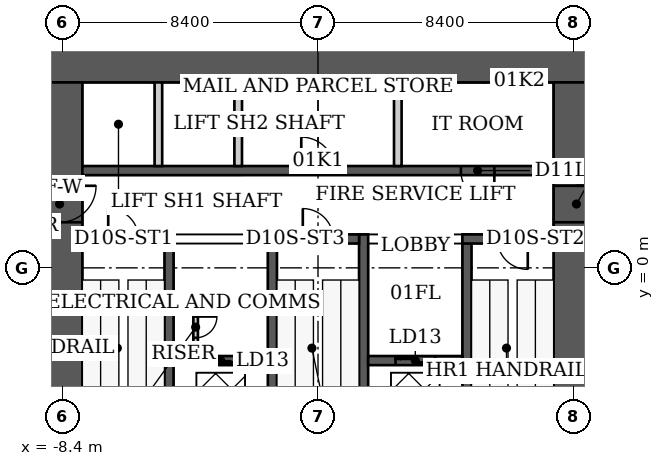
"""IFC4 building model, lengths in metres.
Left out: names, types, materials, properties, quantities, classifications, styles, units other than length and angle.
Written with IfcOpenShell. Run it as: python <this file> out.ifc"""

import sys

from ifc_helpers import new_model, si_unit, direction, frame, frame_2d, origin, place, context, subcontext, project, spatial, rectangle, extrude, element, fill, save


model = new_model("IFC4")
c1 = context("Model", 3, precision=1e-05, world=origin(), true_north=direction((0.0, 1.0)))
c2 = subcontext(c1, "Body", "Model", "MODEL_VIEW")
j1 = project(units=[si_unit("LENGTHUNIT", "METRE"), si_unit("PLANEANGLEUNIT", "RADIAN")], contexts=[c1])
p1 = place(None, origin())
s1 = spatial("IfcSite", under=j1, at=p1, CompositionType="ELEMENT")
p2 = place(p1, origin())
s2 = spatial("IfcBuilding", under=s1, at=p2, CompositionType="ELEMENT")
p3 = place(p2, frame((0.0, 0.0, 6.0)))
s3 = spatial("IfcBuildingStorey", under=s2, at=p3, CompositionType="ELEMENT", Elevation=6.0)
p4 = place(p3, frame((-9.25, 6.85, 0.0), z_axis=(0.0, 0.0, 1.0), x_axis=(1.0, 0.0, 0.0)))
e1 = element("IfcWall", 1, at=p4, inside=s3, PredefinedType="SHEAR", context=c2, shape_type="SweptSolid", body=[
    extrude(rectangle(XDim=18.5, YDim=1.5, at=frame_2d((9.25, 0.0))), origin(), (0.0, 0.0, 1.0), 6.0),
])
p5 = place(p3, frame((-8.5, -9.2, 0.0), z_axis=(0.0, 0.0, 1.0), x_axis=(0.0, 1.0, 0.0)))
e2 = element("IfcWall", 2, at=p5, inside=s3, PredefinedType="SHEAR", context=c2, shape_type="SweptSolid", body=[
    extrude(rectangle(XDim=15.3, YDim=1.5, at=frame_2d((7.65, 0.0))), origin(), (0.0, 0.0, 1.0), 6.0),
])
p6 = place(p5, frame((10.7, 0.0, 0.0)))
e3 = element("IfcOpeningElement", 3, at=p6, cuts=e2, PredefinedType="OPENING", context=c2, shape_type="SweptSolid", body=[
    extrude(rectangle(XDim=1.2, YDim=2.2, at=frame_2d((0.6, 1.1))), frame((0.0, 0.75, 0.0), z_axis=(0.0, -1.0, 0.0), x_axis=(1.0, 0.0, 0.0)), (0.0, 0.0, 1.0), 1.5),
])
p7 = place(p3, frame((8.5, -9.2, 0.0), z_axis=(0.0, 0.0, 1.0), x_axis=(0.0, 1.0, 0.0)))
e4 = element("IfcWall", 4, at=p7, inside=s3, PredefinedType="SHEAR", context=c2, shape_type="SweptSolid", body=[
    extrude(rectangle(XDim=15.3, YDim=1.5, at=frame_2d((7.65, 0.0))), origin(), (0.0, 0.0, 1.0), 6.0),
])
p8 = place(p7, frame((10.7, 0.0, 0.0)))
e5 = element("IfcOpeningElement", 5, at=p8, cuts=e4, PredefinedType="OPENING", context=c2, shape_type="SweptSolid", body=[
    extrude(rectangle(XDim=1.2, YDim=2.2, at=frame_2d((0.6, 1.1))), frame((0.0, 0.75, 0.0), z_axis=(0.0, -1.0, 0.0), x_axis=(1.0, 0.0, 0.0)), (0.0, 0.0, 1.0), 1.5),
])
for number, where, z_axis, x_axis in (
    (6, (-4.9, -6.1, 0.0), (0.0, 0.0, 1.0), (0.0, 1.0, 0.0)),
    (7, (-1.5, -6.1, 0.0), (0.0, 0.0, 1.0), (0.0, 1.0, 0.0)),
    (8, (1.5, -6.1, 0.0), (0.0, 0.0, 1.0), (0.0, 1.0, 0.0)),
    (9, (4.9, -6.1, 0.0), (0.0, 0.0, 1.0), (0.0, 1.0, 0.0)),
):
    element("IfcWall", number, at=place(p3, frame(where, z_axis=z_axis, x_axis=x_axis)), inside=s3, PredefinedType="SHEAR", context=c2, shape_type="SweptSolid", body=[
        extrude(rectangle(XDim=7.2, YDim=0.3, at=frame_2d((3.6, 0.0))), origin(), (0.0, 0.0, 1.0), 6.0),
    ])
p9 = place(p3, frame((-7.75, 0.95, 0.0), z_axis=(0.0, 0.0, 1.0), x_axis=(1.0, 0.0, 0.0)))
e10 = element("IfcWall", 10, at=p9, inside=s3, PredefinedType="SHEAR", context=c2, shape_type="SweptSolid", body=[
    extrude(rectangle(XDim=3.0, YDim=0.3, at=frame_2d((1.5, 0.0))), origin(), (0.0, 0.0, 1.0), 6.0),
])
p10 = place(p9, frame((0.85, 0.0, 0.0)))
e11 = element("IfcOpeningElement", 11, at=p10, cuts=e10, PredefinedType="OPENING", context=c2, shape_type="SweptSolid", body=[
    extrude(rectangle(XDim=1.0, YDim=2.2, at=frame_2d((0.5, 1.1))), frame((0.0, 0.15, 0.0), z_axis=(0.0, -1.0, 0.0), x_axis=(1.0, 0.0, 0.0)), (0.0, 0.0, 1.0), 0.3),
])
p11 = place(p3, frame((-1.35, 0.95, 0.0), z_axis=(0.0, 0.0, 1.0), x_axis=(1.0, 0.0, 0.0)))
e12 = element("IfcWall", 12, at=p11, inside=s3, PredefinedType="SHEAR", context=c2, shape_type="SweptSolid", body=[
    extrude(rectangle(XDim=2.7, YDim=0.3, at=frame_2d((1.35, 0.0))), origin(), (0.0, 0.0, 1.0), 6.0),
])
p12 = place(p11, frame((0.85, 0.0, 0.0)))
e13 = element("IfcOpeningElement", 13, at=p12, cuts=e12, PredefinedType="OPENING", context=c2, shape_type="SweptSolid", body=[
    extrude(rectangle(XDim=1.0, YDim=2.2, at=frame_2d((0.5, 1.1))), frame((0.0, 0.15, 0.0), z_axis=(0.0, -1.0, 0.0), x_axis=(1.0, 0.0, 0.0)), (0.0, 0.0, 1.0), 0.3),
])
p13 = place(p3, frame((4.75, 0.95, 0.0), z_axis=(0.0, 0.0, 1.0), x_axis=(1.0, 0.0, 0.0)))
e14 = element("IfcWall", 14, at=p13, inside=s3, PredefinedType="SHEAR", context=c2, shape_type="SweptSolid", body=[
    extrude(rectangle(XDim=3.0, YDim=0.3, at=frame_2d((1.5, 0.0))), origin(), (0.0, 0.0, 1.0), 6.0),
])
p14 = place(p13, frame((1.15, 0.0, 0.0)))
e15 = element("IfcOpeningElement", 15, at=p14, cuts=e14, PredefinedType="OPENING", context=c2, shape_type="SweptSolid", body=[
    extrude(rectangle(XDim=1.0, YDim=2.2, at=frame_2d((0.5, 1.1))), frame((0.0, 0.15, 0.0), z_axis=(0.0, -1.0, 0.0), x_axis=(1.0, 0.0, 0.0)), (0.0, 0.0, 1.0), 0.3),
])
p15 = place(p3, frame((-4.75, -3.05, 0.0), z_axis=(0.0, 0.0, 1.0), x_axis=(1.0, 0.0, 0.0)))
e16 = element("IfcWall", 16, at=p15, inside=s3, PredefinedType="SHEAR", context=c2, shape_type="SweptSolid", body=[
    extrude(rectangle(XDim=3.1, YDim=0.3, at=frame_2d((1.55, 0.0))), origin(), (0.0, 0.0, 1.0), 6.0),
])
p16 = place(p15, frame((0.9, 0.0, 0.0)))
e17 = element("IfcOpeningElement", 17, at=p16, cuts=e16, PredefinedType="OPENING", context=c2, shape_type="SweptSolid", body=[
    extrude(rectangle(XDim=1.3, YDim=2.1, at=frame_2d((0.65, 1.05))), frame((0.0, 0.15, 0.0), z_axis=(0.0, -1.0, 0.0), x_axis=(1.0, 0.0, 0.0)), (0.0, 0.0, 1.0), 0.3),
])
p17 = place(p3, frame((1.65, -3.05, 0.0), z_axis=(0.0, 0.0, 1.0), x_axis=(1.0, 0.0, 0.0)))
e18 = element("IfcWall", 18, at=p17, inside=s3, PredefinedType="SHEAR", context=c2, shape_type="SweptSolid", body=[
    extrude(rectangle(XDim=3.1, YDim=0.3, at=frame_2d((1.55, 0.0))), origin(), (0.0, 0.0, 1.0), 6.0),
])
p18 = place(p17, frame((0.9, 0.0, 0.0)))
e19 = element("IfcOpeningElement", 19, at=p18, cuts=e18, PredefinedType="OPENING", context=c2, shape_type="SweptSolid", body=[
    extrude(rectangle(XDim=1.3, YDim=2.1, at=frame_2d((0.65, 1.05))), frame((0.0, 0.15, 0.0), z_axis=(0.0, -1.0, 0.0), x_axis=(1.0, 0.0, 0.0)), (0.0, 0.0, 1.0), 0.3),
])
p19 = place(p3, frame((-7.75, 3.2, 0.0), z_axis=(0.0, 0.0, 1.0), x_axis=(1.0, 0.0, 0.0)))
e20 = element("IfcWall", 20, at=p19, inside=s3, PredefinedType="SHEAR", context=c2, shape_type="SweptSolid", body=[
    extrude(rectangle(XDim=15.5, YDim=0.3, at=frame_2d((7.75, 0.0))), origin(), (0.0, 0.0, 1.0), 6.0),
])
p20 = place(p19, frame((7.2, 0.0, 0.0)))
e21 = element("IfcOpeningElement", 21, at=p20, cuts=e20, PredefinedType="OPENING", context=c2, shape_type="SweptSolid", body=[
    extrude(rectangle(XDim=1.1, YDim=2.2, at=frame_2d((0.55, 1.1))), frame((0.0, 0.15, 0.0), z_axis=(0.0, -1.0, 0.0), x_axis=(1.0, 0.0, 0.0)), (0.0, 0.0, 1.0), 0.3),
])
p21 = place(p19, frame((12.45, 0.0, 0.0)))
e22 = element("IfcOpeningElement", 22, at=p21, cuts=e20, PredefinedType="OPENING", context=c2, shape_type="SweptSolid", body=[
    extrude(rectangle(XDim=1.1, YDim=2.2, at=frame_2d((0.55, 1.1))), frame((0.0, 0.15, 0.0), z_axis=(0.0, -1.0, 0.0), x_axis=(1.0, 0.0, 0.0)), (0.0, 0.0, 1.0), 0.3),
])
for number, where, z_axis, x_axis in (
    (23, (-5.25, 3.35, 0.0), (0.0, 0.0, 1.0), (0.0, 1.0, 0.0)),
    (24, (-2.625, 3.35, 0.0), (0.0, 0.0, 1.0), (0.0, 1.0, 0.0)),
    (25, (2.625, 3.35, 0.0), (0.0, 0.0, 1.0), (0.0, 1.0, 0.0)),
):
    element("IfcWall", number, at=place(p3, frame(where, z_axis=z_axis, x_axis=x_axis)), inside=s3, PredefinedType="PARTITIONING", context=c2, shape_type="SweptSolid", body=[
        extrude(rectangle(XDim=2.75, YDim=0.25, at=frame_2d((1.375, 0.0))), origin(), (0.0, 0.0, 1.0), 6.0),
    ])
p22 = place(p3, frame((-4.025, -2.9, 0.0), z_axis=(0.0, 0.0, 1.0), x_axis=(0.0, 1.0, 0.0)))
e26 = element("IfcWall", 26, at=p22, inside=s3, PredefinedType="PARTITIONING", context=c2, shape_type="SweptSolid", body=[
    extrude(rectangle(XDim=1.775, YDim=0.15, at=frame_2d((0.887, 0.0))), origin(), (0.0, 0.0, 1.0), 5.84),
])
p23 = place(p22, frame((0.6, 0.0, 0.0)))
e27 = element("IfcOpeningElement", 27, at=p23, cuts=e26, PredefinedType="OPENING", context=c2, shape_type="SweptSolid", body=[
    extrude(rectangle(XDim=0.7, YDim=2.1, at=frame_2d((0.35, 1.05))), frame((0.0, 0.075, 0.0), z_axis=(0.0, -1.0, 0.0), x_axis=(1.0, 0.0, 0.0)), (0.0, 0.0, 1.0), 0.15),
])
p24 = place(p3, frame((-4.75, -1.2, 0.0), z_axis=(0.0, 0.0, 1.0), x_axis=(1.0, 0.0, 0.0)))
e28 = element("IfcWall", 28, at=p24, inside=s3, PredefinedType="PARTITIONING", context=c2, shape_type="SweptSolid", body=[
    extrude(rectangle(XDim=0.8, YDim=0.15, at=frame_2d((0.4, 0.0))), origin(), (0.0, 0.0, 1.0), 5.84),
])
p25 = place(p10, origin())
e29 = element("IfcDoor", 29, at=p25, inside=s3, OperationType="SINGLE_SWING_LEFT", PredefinedType="DOOR", context=c2, shape_type="SweptSolid", body=[
    extrude(rectangle(XDim=1.0, YDim=2.2, at=frame_2d((0.5, 1.1))), frame((0.0, 0.025, 0.0), z_axis=(0.0, -1.0, 0.0), x_axis=(1.0, 0.0, 0.0)), (0.0, 0.0, 1.0), 0.05),
])
fill(e11, e29)
p26 = place(p12, origin())
e30 = element("IfcDoor", 30, at=p26, inside=s3, OperationType="SINGLE_SWING_LEFT", PredefinedType="DOOR", context=c2, shape_type="SweptSolid", body=[
    extrude(rectangle(XDim=1.0, YDim=2.2, at=frame_2d((0.5, 1.1))), frame((0.0, 0.025, 0.0), z_axis=(0.0, -1.0, 0.0), x_axis=(1.0, 0.0, 0.0)), (0.0, 0.0, 1.0), 0.05),
])
fill(e13, e30)
p27 = place(p14, origin())
e31 = element("IfcDoor", 31, at=p27, inside=s3, OperationType="SINGLE_SWING_RIGHT", PredefinedType="DOOR", context=c2, shape_type="SweptSolid", body=[
    extrude(rectangle(XDim=1.0, YDim=2.2, at=frame_2d((0.5, 1.1))), frame((0.0, 0.025, 0.0), z_axis=(0.0, -1.0, 0.0), x_axis=(1.0, 0.0, 0.0)), (0.0, 0.0, 1.0), 0.05),
])
fill(e15, e31)
p28 = place(p6, origin())
e32 = element("IfcDoor", 32, at=p28, inside=s3, OperationType="SINGLE_SWING_RIGHT", PredefinedType="DOOR", context=c2, shape_type="SweptSolid", body=[
    extrude(rectangle(XDim=1.2, YDim=2.2, at=frame_2d((0.6, 1.1))), frame((0.0, 0.025, 0.0), z_axis=(0.0, -1.0, 0.0), x_axis=(1.0, 0.0, 0.0)), (0.0, 0.0, 1.0), 0.05),
])
fill(e3, e32)
p29 = place(p8, origin())
e33 = element("IfcDoor", 33, at=p29, inside=s3, OperationType="SINGLE_SWING_RIGHT", PredefinedType="DOOR", context=c2, shape_type="SweptSolid", body=[
    extrude(rectangle(XDim=1.2, YDim=2.2, at=frame_2d((0.6, 1.1))), frame((0.0, 0.025, 0.0), z_axis=(0.0, -1.0, 0.0), x_axis=(1.0, 0.0, 0.0)), (0.0, 0.0, 1.0), 0.05),
])
fill(e5, e33)
p30 = place(p23, origin())
e34 = element("IfcDoor", 34, at=p30, inside=s3, OperationType="SINGLE_SWING_RIGHT", PredefinedType="DOOR", context=c2, shape_type="SweptSolid", body=[
    extrude(rectangle(XDim=0.7, YDim=2.1, at=frame_2d((0.35, 1.05))), frame((0.0, 0.025, 0.0), z_axis=(0.0, -1.0, 0.0), x_axis=(1.0, 0.0, 0.0)), (0.0, 0.0, 1.0), 0.05),
])
fill(e27, e34)
p31 = place(p20, origin())
e35 = element("IfcDoor", 35, at=p31, inside=s3, OperationType="SINGLE_SWING_LEFT", PredefinedType="DOOR", context=c2, shape_type="SweptSolid", body=[
    extrude(rectangle(XDim=1.1, YDim=2.2, at=frame_2d((0.55, 1.1))), frame((0.0, 0.025, 0.0), z_axis=(0.0, -1.0, 0.0), x_axis=(1.0, 0.0, 0.0)), (0.0, 0.0, 1.0), 0.05),
])
fill(e21, e35)
p32 = place(p21, origin())
e36 = element("IfcDoor", 36, at=p32, inside=s3, OperationType="SINGLE_SWING_RIGHT", PredefinedType="DOOR", context=c2, shape_type="SweptSolid", body=[
    extrude(rectangle(XDim=1.1, YDim=2.2, at=frame_2d((0.55, 1.1))), frame((0.0, 0.025, 0.0), z_axis=(0.0, -1.0, 0.0), x_axis=(1.0, 0.0, 0.0)), (0.0, 0.0, 1.0), 0.05),
])
fill(e22, e36)
p33 = place(p16, origin())
e37 = element("IfcDoor", 37, at=p33, inside=s3, OperationType="DOUBLE_DOOR_SLIDING", PredefinedType="DOOR", context=c2, shape_type="SweptSolid", body=[
    extrude(rectangle(XDim=1.3, YDim=2.1, at=frame_2d((0.65, 1.05))), frame((0.0, 0.025, 0.0), z_axis=(0.0, -1.0, 0.0), x_axis=(1.0, 0.0, 0.0)), (0.0, 0.0, 1.0), 0.05),
])
fill(e17, e37)
p34 = place(p18, origin())
e38 = element("IfcDoor", 38, at=p34, inside=s3, OperationType="DOUBLE_DOOR_SLIDING", PredefinedType="DOOR", context=c2, shape_type="SweptSolid", body=[
    extrude(rectangle(XDim=1.3, YDim=2.1, at=frame_2d((0.65, 1.05))), frame((0.0, 0.025, 0.0), z_axis=(0.0, -1.0, 0.0), x_axis=(1.0, 0.0, 0.0)), (0.0, 0.0, 1.0), 0.05),
])
fill(e19, e38)
save(model, sys.argv[1])
